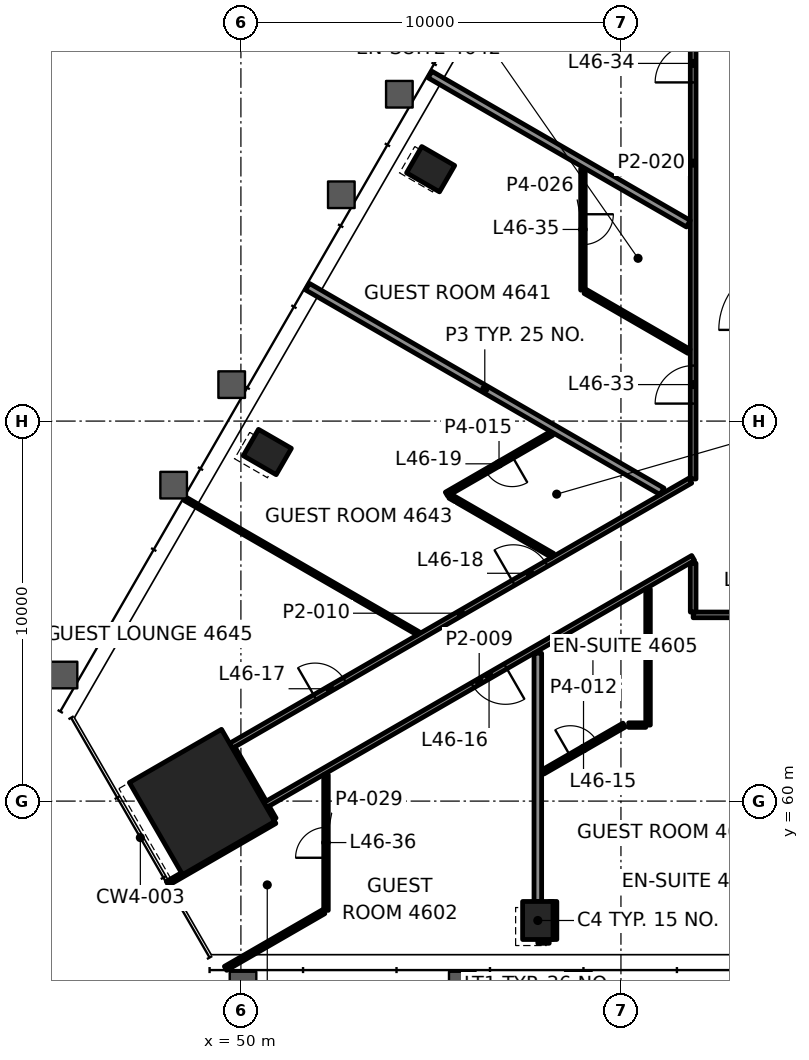
"""IFC4 building model, lengths in metres.
Left out: names, types, materials, properties, quantities, classifications, styles, units other than length and angle.
Written with IfcOpenShell. Run it as: python <this file> out.ifc"""

import sys

from ifc_helpers import new_model, si_unit, direction, frame, frame_2d, origin, origin_2d, place, context, subcontext, project, spatial, rectangle, hollow_rectangle, extrude, element, fill, save


model = new_model("IFC4")
c1 = context("Model", 3, precision=1e-05, world=origin(), true_north=direction((0.0, 1.0)))
c2 = subcontext(c1, "Body", "Model", "MODEL_VIEW")
j1 = project(units=[si_unit("LENGTHUNIT", "METRE"), si_unit("PLANEANGLEUNIT", "RADIAN")], contexts=[c1])
p1 = place(None, origin())
s1 = spatial("IfcSite", under=j1, at=p1, CompositionType="ELEMENT")
p2 = place(p1, origin())
s2 = spatial("IfcBuilding", under=s1, at=p2, CompositionType="ELEMENT")
p3 = place(p2, frame((0.0, 0.0, 198.7)))
s3 = spatial("IfcBuildingStorey", under=s2, at=p3, CompositionType="ELEMENT", Elevation=198.7)
p4 = place(p3, frame((48.978, 59.976, 0.0), z_axis=(0.0, 0.0, 1.0), x_axis=(0.5, -0.866025403784, 0.0)))
e1 = element("IfcColumn", 1, at=p4, inside=s3, PredefinedType="COLUMN", context=c2, shape_type="SweptSolid", body=[
    extrude(rectangle(XDim=2.8, YDim=2.8, at=origin_2d()), origin(), (0.0, 0.0, 1.0), 3.9),
])
for number, where, z_axis, x_axis in (
    (2, (57.812, 56.858, -0.0), (0.0, 0.0, 1.0), (1.0, 0.0, 0.0)),
    (3, (54.992, 76.628, -0.0), (0.0, 0.0, 1.0), (-0.5, -0.866, 0.0)),
    (4, (50.695, 69.186, -0.0), (0.0, 0.0, 1.0), (-0.5, -0.866, 0.0)),
):
    element("IfcColumn", number, at=place(p3, frame(where, z_axis=z_axis, x_axis=x_axis)), inside=s3, PredefinedType="COLUMN", context=c2, shape_type="SweptSolid", body=[
        extrude(hollow_rectangle(XDim=0.8, YDim=1.0, WallThickness=0.05, at=origin_2d()), origin(), (0.0, 0.0, 1.0), 3.9),
    ])
p5 = place(p3, frame((57.812, 56.358, 0.0), z_axis=(0.0, 0.0, 1.0), x_axis=(1.0, 0.0, 0.0)))
e5 = element("IfcWall", 5, at=p5, inside=s3, PredefinedType="PARTITIONING", context=c2, shape_type="SweptSolid", body=[
    extrude(rectangle(XDim=0.3, YDim=0.2, at=frame_2d((0.15, 0.0))), origin(), (0.0, 0.0, 1.0), 3.1),
])
p6 = place(p3, frame((60.203, 62.0, 0.0), z_axis=(0.0, 0.0, 1.0), x_axis=(1.0, 0.0, 0.0)))
e6 = element("IfcWall", 6, at=p6, inside=s3, PredefinedType="PARTITIONING", context=c2, shape_type="SweptSolid", body=[
    extrude(rectangle(XDim=0.449, YDim=0.12, at=frame_2d((0.225, 0.0))), origin(), (0.0, 0.0, 1.0), 3.1),
])
p7 = place(p3, frame((88.1, 64.9, 0.0), z_axis=(0.0, 0.0, 1.0), x_axis=(-1.0, 0.0, 0.0)))
e7 = element("IfcWall", 7, at=p7, inside=s3, PredefinedType="PARTITIONING", context=c2, shape_type="SweptSolid", body=[
    extrude(rectangle(XDim=26.2, YDim=0.15, at=frame_2d((13.1, 0.0))), origin(), (0.0, 0.0, 1.0), 3.1),
])
p8 = place(p7, frame((7.443, 0.0, 0.0)))
e8 = element("IfcOpeningElement", 8, at=p8, cuts=e7, PredefinedType="OPENING", context=c2, shape_type="SweptSolid", body=[
    extrude(rectangle(XDim=1.0, YDim=2.1, at=frame_2d((0.5, 1.05))), frame((0.0, 0.085, 0.0), z_axis=(0.0, -1.0, 0.0), x_axis=(1.0, 0.0, 0.0)), (0.0, 0.0, 1.0), 0.17),
])
p9 = place(p7, frame((16.037, 0.0, 0.0)))
e9 = element("IfcOpeningElement", 9, at=p9, cuts=e7, PredefinedType="OPENING", context=c2, shape_type="SweptSolid", body=[
    extrude(rectangle(XDim=1.0, YDim=2.1, at=frame_2d((0.5, 1.05))), frame((0.0, 0.085, 0.0), z_axis=(0.0, -1.0, 0.0), x_axis=(1.0, 0.0, 0.0)), (0.0, 0.0, 1.0), 0.17),
])
p10 = place(p7, frame((19.747, 0.0, 0.0)))
e10 = element("IfcOpeningElement", 10, at=p10, cuts=e7, PredefinedType="OPENING", context=c2, shape_type="SweptSolid", body=[
    extrude(rectangle(XDim=1.0, YDim=2.1, at=frame_2d((0.5, 1.05))), frame((0.0, 0.085, 0.0), z_axis=(0.0, -1.0, 0.0), x_axis=(1.0, 0.0, 0.0)), (0.0, 0.0, 1.0), 0.17),
])
p11 = place(p7, frame((24.013, 0.0, 0.0)))
e11 = element("IfcOpeningElement", 11, at=p11, cuts=e7, PredefinedType="OPENING", context=c2, shape_type="SweptSolid", body=[
    extrude(rectangle(XDim=1.0, YDim=2.1, at=frame_2d((0.5, 1.05))), frame((0.0, 0.085, 0.0), z_axis=(0.0, -1.0, 0.0), x_axis=(1.0, 0.0, 0.0)), (0.0, 0.0, 1.0), 0.17),
])
p12 = place(p3, frame((49.595, 55.598, 0.0), z_axis=(0.0, 0.0, 1.0), x_axis=(0.866028872743, 0.499993991539, 0.0)))
e12 = element("IfcWall", 12, at=p12, inside=s3, PredefinedType="PARTITIONING", context=c2, shape_type="SweptSolid", body=[
    extrude(rectangle(XDim=2.983, YDim=0.12, at=frame_2d((1.492, 0.0))), origin(), (0.0, 0.0, 1.0), 3.1),
])
p13 = place(p3, frame((57.947, 60.767, 0.0), z_axis=(0.0, 0.0, 1.0), x_axis=(0.866060325455, 0.499939509014, 0.0)))
e13 = element("IfcWall", 13, at=p13, inside=s3, PredefinedType="PARTITIONING", context=c2, shape_type="SweptSolid", body=[
    extrude(rectangle(XDim=2.467, YDim=0.12, at=frame_2d((1.233, 0.0))), origin(), (0.0, 0.0, 1.0), 3.1),
])
p14 = place(p13, frame((0.833, 0.0, 0.0)))
e14 = element("IfcOpeningElement", 14, at=p14, cuts=e13, PredefinedType="OPENING", context=c2, shape_type="SweptSolid", body=[
    extrude(rectangle(XDim=0.8, YDim=2.1, at=frame_2d((0.4, 1.05))), frame((0.0, 0.07, 0.0), z_axis=(0.0, -1.0, 0.0), x_axis=(1.0, 0.0, 0.0)), (0.0, 0.0, 1.0), 0.14),
])
p15 = place(p3, frame((48.067, 57.834, 0.0), z_axis=(0.0, 0.0, 1.0), x_axis=(0.866035906198, 0.499981808845, 0.0)))
e15 = element("IfcWall", 15, at=p15, inside=s3, PredefinedType="PARTITIONING", context=c2, shape_type="SweptSolid", body=[
    extrude(rectangle(XDim=3.259, YDim=0.12, at=frame_2d((1.63, 0.0))), origin(), (0.0, 0.0, 1.0), 3.1),
])
p16 = place(p3, frame((61.9, 66.397, 0.0), z_axis=(0.0, 0.0, 1.0), x_axis=(-0.866028610752, -0.499994445327, 0.0)))
e16 = element("IfcWall", 16, at=p16, inside=s3, PredefinedType="PARTITIONING", context=c2, shape_type="SweptSolid", body=[
    extrude(rectangle(XDim=13.002, YDim=0.15, at=frame_2d((6.501, 0.0))), origin(), (0.0, 0.0, 1.0), 2.947),
])
p17 = place(p16, frame((5.701, 0.0, 0.0)))
e17 = element("IfcOpeningElement", 17, at=p17, cuts=e16, PredefinedType="OPENING", context=c2, shape_type="SweptSolid", body=[
    extrude(rectangle(XDim=1.0, YDim=2.1, at=frame_2d((0.5, 1.05))), frame((0.0, 0.085, 0.0), z_axis=(0.0, -1.0, 0.0), x_axis=(1.0, 0.0, 0.0)), (0.0, 0.0, 1.0), 0.17),
])
p18 = place(p3, frame((49.74, 61.456, 0.0), z_axis=(0.0, 0.0, 1.0), x_axis=(0.866030582951, 0.499991029314, 0.0)))
e18 = element("IfcWall", 18, at=p18, inside=s3, PredefinedType="PARTITIONING", context=c2, shape_type="SweptSolid", body=[
    extrude(rectangle(XDim=13.954, YDim=0.15, at=frame_2d((6.977, 0.0))), origin(), (0.0, 0.0, 1.0), 3.1),
])
p19 = place(p18, frame((2.552, 0.0, 0.0)))
e19 = element("IfcOpeningElement", 19, at=p19, cuts=e18, PredefinedType="OPENING", context=c2, shape_type="SweptSolid", body=[
    extrude(rectangle(XDim=0.9, YDim=2.1, at=frame_2d((0.45, 1.05))), frame((0.0, 0.085, 0.0), z_axis=(0.0, -1.0, 0.0), x_axis=(1.0, 0.0, 0.0)), (0.0, 0.0, 1.0), 0.17),
])
p20 = place(p18, frame((8.579, 0.0, 0.0)))
e20 = element("IfcOpeningElement", 20, at=p20, cuts=e18, PredefinedType="OPENING", context=c2, shape_type="SweptSolid", body=[
    extrude(rectangle(XDim=1.0, YDim=2.1, at=frame_2d((0.5, 1.05))), frame((0.0, 0.085, 0.0), z_axis=(0.0, -1.0, 0.0), x_axis=(1.0, 0.0, 0.0)), (0.0, 0.0, 1.0), 0.17),
])
p21 = place(p3, frame((58.175, 69.674, 0.0), z_axis=(0.0, 0.0, 1.0), x_axis=(-0.866051923801, -0.49995406317, 0.0)))
e21 = element("IfcWall", 21, at=p21, inside=s3, PredefinedType="PARTITIONING", context=c2, shape_type="SweptSolid", body=[
    extrude(rectangle(XDim=3.194, YDim=0.12, at=frame_2d((1.597, 0.0))), origin(), (0.0, 0.0, 1.0), 3.1),
])
p22 = place(p21, frame((1.197, 0.0, 0.0)))
e22 = element("IfcOpeningElement", 22, at=p22, cuts=e21, PredefinedType="OPENING", context=c2, shape_type="SweptSolid", body=[
    extrude(rectangle(XDim=0.8, YDim=2.1, at=frame_2d((0.4, 1.05))), frame((0.0, 0.07, 0.0), z_axis=(0.0, -1.0, 0.0), x_axis=(1.0, 0.0, 0.0)), (0.0, 0.0, 1.0), 0.14),
])
p23 = place(p3, frame((61.9, 64.975, 0.0), z_axis=(0.0, 0.0, 1.0), x_axis=(0.0, 1.0, 0.0)))
e23 = element("IfcWall", 23, at=p23, inside=s3, PredefinedType="PARTITIONING", context=c2, shape_type="SweptSolid", body=[
    extrude(rectangle(XDim=1.286, YDim=0.15, at=frame_2d((0.643, 0.0))), origin(), (0.0, 0.0, 1.0), 2.947),
])
p24 = place(p3, frame((61.9, 68.476, 0.0), z_axis=(0.0, 0.0, 1.0), x_axis=(0.0, 1.0, 0.0)))
e24 = element("IfcWall", 24, at=p24, inside=s3, PredefinedType="PARTITIONING", context=c2, shape_type="SweptSolid", body=[
    extrude(rectangle(XDim=16.624, YDim=0.15, at=frame_2d((8.312, 0.0))), origin(), (0.0, 0.0, 1.0), 3.1),
])
p25 = place(p24, frame((1.984, 0.0, 0.0)))
e25 = element("IfcOpeningElement", 25, at=p25, cuts=e24, PredefinedType="OPENING", context=c2, shape_type="SweptSolid", body=[
    extrude(rectangle(XDim=1.0, YDim=2.1, at=frame_2d((0.5, 1.05))), frame((0.0, 0.085, 0.0), z_axis=(0.0, -1.0, 0.0), x_axis=(1.0, 0.0, 0.0)), (0.0, 0.0, 1.0), 0.17),
])
p26 = place(p24, frame((10.437, 0.0, 0.0)))
e26 = element("IfcOpeningElement", 26, at=p26, cuts=e24, PredefinedType="OPENING", context=c2, shape_type="SweptSolid", body=[
    extrude(rectangle(XDim=1.0, YDim=2.1, at=frame_2d((0.5, 1.05))), frame((0.0, 0.085, 0.0), z_axis=(0.0, -1.0, 0.0), x_axis=(1.0, 0.0, 0.0)), (0.0, 0.0, 1.0), 0.17),
])
p27 = place(p3, frame((60.713, 62.0, 0.0), z_axis=(0.0, 0.0, 1.0), x_axis=(0.0, 1.0, 0.0)))
e27 = element("IfcWall", 27, at=p27, inside=s3, PredefinedType="PARTITIONING", context=c2, shape_type="SweptSolid", body=[
    extrude(rectangle(XDim=3.585, YDim=0.12, at=frame_2d((1.793, 0.0))), origin(), (0.0, 0.0, 1.0), 2.947),
])
p28 = place(p3, frame((59.0, 76.64, 0.0), z_axis=(0.0, 0.0, 1.0), x_axis=(0.0, -1.0, 0.0)))
e28 = element("IfcWall", 28, at=p28, inside=s3, PredefinedType="PARTITIONING", context=c2, shape_type="SweptSolid", body=[
    extrude(rectangle(XDim=3.194, YDim=0.12, at=frame_2d((1.597, 0.0))), origin(), (0.0, 0.0, 1.0), 3.1),
])
p29 = place(p28, frame((1.197, 0.0, 0.0)))
e29 = element("IfcOpeningElement", 29, at=p29, cuts=e28, PredefinedType="OPENING", context=c2, shape_type="SweptSolid", body=[
    extrude(rectangle(XDim=0.8, YDim=2.1, at=frame_2d((0.4, 1.05))), frame((0.0, 0.07, 0.0), z_axis=(0.0, -1.0, 0.0), x_axis=(1.0, 0.0, 0.0)), (0.0, 0.0, 1.0), 0.14),
])
p30 = place(p3, frame((58.213, 56.358, 0.0), z_axis=(0.0, 0.0, 1.0), x_axis=(0.0, 1.0, 0.0)))
e30 = element("IfcWall", 30, at=p30, inside=s3, PredefinedType="PARTITIONING", context=c2, shape_type="SweptSolid", body=[
    extrude(rectangle(XDim=1.0, YDim=0.2, at=frame_2d((0.5, 0.0))), origin(), (0.0, 0.0, 1.0), 3.022),
])
p31 = place(p3, frame((57.813, 57.358, 0.0), z_axis=(0.0, 0.0, 1.0), x_axis=(0.0, 1.0, 0.0)))
e31 = element("IfcWall", 31, at=p31, inside=s3, PredefinedType="PARTITIONING", context=c2, shape_type="SweptSolid", body=[
    extrude(rectangle(XDim=6.532, YDim=0.2, at=frame_2d((3.266, 0.0))), origin(), (0.0, 0.0, 1.0), 3.1),
])
p32 = place(p3, frame((52.239, 57.125, 0.0), z_axis=(0.0, 0.0, 1.0), x_axis=(0.0, 1.0, 0.0)))
e32 = element("IfcWall", 32, at=p32, inside=s3, PredefinedType="PARTITIONING", context=c2, shape_type="SweptSolid", body=[
    extrude(rectangle(XDim=3.569, YDim=0.12, at=frame_2d((1.784, 0.0))), origin(), (0.0, 0.0, 1.0), 3.1),
])
p33 = place(p32, frame((1.384, 0.0, 0.0)))
e33 = element("IfcOpeningElement", 33, at=p33, cuts=e32, PredefinedType="OPENING", context=c2, shape_type="SweptSolid", body=[
    extrude(rectangle(XDim=0.8, YDim=2.1, at=frame_2d((0.4, 1.05))), frame((0.0, 0.07, 0.0), z_axis=(0.0, -1.0, 0.0), x_axis=(1.0, 0.0, 0.0)), (0.0, 0.0, 1.0), 0.14),
])
p34 = place(p3, frame((50.86, 59.516, 0.0), z_axis=(0.0, 0.0, 1.0), x_axis=(-0.499741784413, 0.866174433305, 0.0)))
e34 = element("IfcWall", 34, at=p34, inside=s3, PredefinedType="PARTITIONING", context=c2, shape_type="SweptSolid", body=[
    extrude(rectangle(XDim=0.365, YDim=0.15, at=frame_2d((0.182, 0.0))), origin(), (0.0, 0.0, 1.0), 3.1),
])
p35 = place(p3, frame((61.773, 75.195, 0.0), z_axis=(0.0, 0.0, 1.0), x_axis=(-0.866029689717, 0.499992576473, 0.0)))
e35 = element("IfcWall", 35, at=p35, inside=s3, PredefinedType="PARTITIONING", context=c2, shape_type="SweptSolid", body=[
    extrude(rectangle(XDim=7.85, YDim=0.2, at=frame_2d((3.925, 0.0))), origin(), (0.0, 0.0, 1.0), 3.022),
])
p36 = place(p3, frame((61.79, 71.835, 0.0), z_axis=(0.0, 0.0, 1.0), x_axis=(-0.866028267601, 0.499995039691, 0.0)))
e36 = element("IfcWall", 36, at=p36, inside=s3, PredefinedType="PARTITIONING", context=c2, shape_type="SweptSolid", body=[
    extrude(rectangle(XDim=3.153, YDim=0.12, at=frame_2d((1.576, 0.0))), origin(), (0.0, 0.0, 1.0), 3.1),
])
p37 = place(p3, frame((61.082, 68.15, 0.0), z_axis=(0.0, 0.0, 1.0), x_axis=(-0.866015766609, 0.500016691706, 0.0)))
e37 = element("IfcWall", 37, at=p37, inside=s3, PredefinedType="PARTITIONING", context=c2, shape_type="SweptSolid", body=[
    extrude(rectangle(XDim=10.774, YDim=0.2, at=frame_2d((5.387, 0.0))), origin(), (0.0, 0.0, 1.0), 3.022),
])
p38 = place(p3, frame((58.199, 66.466, 0.0), z_axis=(0.0, 0.0, 1.0), x_axis=(-0.866028856698, 0.499994019331, 0.0)))
e38 = element("IfcWall", 38, at=p38, inside=s3, PredefinedType="PARTITIONING", context=c2, shape_type="SweptSolid", body=[
    extrude(rectangle(XDim=3.113, YDim=0.12, at=frame_2d((1.556, 0.0))), origin(), (0.0, 0.0, 1.0), 3.1),
])
p39 = place(p3, frame((54.663, 64.414, 0.0), z_axis=(0.0, 0.0, 1.0), x_axis=(-0.866013364391, 0.500020852261, 0.0)))
e39 = element("IfcWall", 39, at=p39, inside=s3, PredefinedType="PARTITIONING", context=c2, shape_type="SweptSolid", body=[
    extrude(rectangle(XDim=7.082, YDim=0.1, at=frame_2d((3.541, 0.0))), origin(), (0.0, 0.0, 1.0), 3.1),
])
p40 = place(p3, frame((50.603, 59.962, 0.0), z_axis=(0.0, 0.0, 1.0), x_axis=(-0.499991515992, 0.866030301974, 0.0)))
e40 = element("IfcWall", 40, at=p40, inside=s3, PredefinedType="PARTITIONING", context=c2, shape_type="SweptSolid", body=[
    extrude(rectangle(XDim=1.649, YDim=0.15, at=frame_2d((0.825, 0.0))), origin(), (0.0, 0.0, 1.0), 2.947),
])
p41 = place(p14, origin())
e41 = element("IfcDoor", 41, at=p41, inside=s3, OperationType="SINGLE_SWING_RIGHT", PredefinedType="DOOR", context=c2, shape_type="SweptSolid", body=[
    extrude(rectangle(XDim=0.8, YDim=2.1, at=frame_2d((0.4, 1.05))), frame((0.0, 0.025, 0.0), z_axis=(0.0, -1.0, 0.0), x_axis=(1.0, 0.0, 0.0)), (0.0, 0.0, 1.0), 0.05),
])
fill(e14, e41)
p42 = place(p17, origin())
e42 = element("IfcDoor", 42, at=p42, inside=s3, OperationType="SINGLE_SWING_RIGHT", PredefinedType="DOOR", context=c2, shape_type="SweptSolid", body=[
    extrude(rectangle(XDim=1.0, YDim=2.1, at=frame_2d((0.5, 1.05))), frame((0.0, 0.025, 0.0), z_axis=(0.0, -1.0, 0.0), x_axis=(1.0, 0.0, 0.0)), (0.0, 0.0, 1.0), 0.05),
])
fill(e17, e42)
p43 = place(p19, origin())
e43 = element("IfcDoor", 43, at=p43, inside=s3, OperationType="SINGLE_SWING_RIGHT", PredefinedType="DOOR", context=c2, shape_type="SweptSolid", body=[
    extrude(rectangle(XDim=0.9, YDim=2.1, at=frame_2d((0.45, 1.05))), frame((0.0, 0.025, 0.0), z_axis=(0.0, -1.0, 0.0), x_axis=(1.0, 0.0, 0.0)), (0.0, 0.0, 1.0), 0.05),
])
fill(e19, e43)
p44 = place(p20, origin())
e44 = element("IfcDoor", 44, at=p44, inside=s3, OperationType="SINGLE_SWING_RIGHT", PredefinedType="DOOR", context=c2, shape_type="SweptSolid", body=[
    extrude(rectangle(XDim=1.0, YDim=2.1, at=frame_2d((0.5, 1.05))), frame((0.0, 0.025, 0.0), z_axis=(0.0, -1.0, 0.0), x_axis=(1.0, 0.0, 0.0)), (0.0, 0.0, 1.0), 0.05),
])
fill(e20, e44)
p45 = place(p22, origin())
e45 = element("IfcDoor", 45, at=p45, inside=s3, OperationType="SINGLE_SWING_RIGHT", PredefinedType="DOOR", context=c2, shape_type="SweptSolid", body=[
    extrude(rectangle(XDim=0.8, YDim=2.1, at=frame_2d((0.4, 1.05))), frame((0.0, 0.025, 0.0), z_axis=(0.0, -1.0, 0.0), x_axis=(1.0, 0.0, 0.0)), (0.0, 0.0, 1.0), 0.05),
])
fill(e22, e45)
p46 = place(p25, origin())
e46 = element("IfcDoor", 46, at=p46, inside=s3, OperationType="SINGLE_SWING_RIGHT", PredefinedType="DOOR", context=c2, shape_type="SweptSolid", body=[
    extrude(rectangle(XDim=1.0, YDim=2.1, at=frame_2d((0.5, 1.05))), frame((0.0, 0.025, 0.0), z_axis=(0.0, -1.0, 0.0), x_axis=(1.0, 0.0, 0.0)), (0.0, 0.0, 1.0), 0.05),
])
fill(e25, e46)
p47 = place(p26, origin())
e47 = element("IfcDoor", 47, at=p47, inside=s3, OperationType="SINGLE_SWING_RIGHT", PredefinedType="DOOR", context=c2, shape_type="SweptSolid", body=[
    extrude(rectangle(XDim=1.0, YDim=2.1, at=frame_2d((0.5, 1.05))), frame((0.0, 0.025, 0.0), z_axis=(0.0, -1.0, 0.0), x_axis=(1.0, 0.0, 0.0)), (0.0, 0.0, 1.0), 0.05),
])
fill(e26, e47)
p48 = place(p29, origin())
e48 = element("IfcDoor", 48, at=p48, inside=s3, OperationType="SINGLE_SWING_RIGHT", PredefinedType="DOOR", context=c2, shape_type="SweptSolid", body=[
    extrude(rectangle(XDim=0.8, YDim=2.1, at=frame_2d((0.4, 1.05))), frame((0.0, 0.025, 0.0), z_axis=(0.0, -1.0, 0.0), x_axis=(1.0, 0.0, 0.0)), (0.0, 0.0, 1.0), 0.05),
])
fill(e29, e48)
p49 = place(p33, origin())
e49 = element("IfcDoor", 49, at=p49, inside=s3, OperationType="SINGLE_SWING_RIGHT", PredefinedType="DOOR", context=c2, shape_type="SweptSolid", body=[
    extrude(rectangle(XDim=0.8, YDim=2.1, at=frame_2d((0.4, 1.05))), frame((0.0, 0.025, 0.0), z_axis=(0.0, -1.0, 0.0), x_axis=(1.0, 0.0, 0.0)), (0.0, 0.0, 1.0), 0.05),
])
fill(e33, e49)
p50 = place(p3, origin())
p51 = place(p50, frame((52.085, 55.553, 0.15), z_axis=(0.0, 0.0, 1.0), x_axis=(1.0, 0.0, 0.0)))
p52 = place(p51, origin())
e50 = element("IfcWindow", 50, at=p52, inside=s3, PartitioningType="SINGLE_PANEL", PredefinedType="WINDOW", context=c2, shape_type="SweptSolid", body=[
    extrude(rectangle(XDim=2.789, YDim=3.55, at=frame_2d((1.395, 1.775))), frame((0.0, 0.03, 0.0), z_axis=(0.0, -1.0, 0.0), x_axis=(1.0, 0.0, 0.0)), (0.0, 0.0, 1.0), 0.06),
])
p53 = place(p50, frame((52.4, 74.749, 0.15), z_axis=(0.0, 0.0, 1.0), x_axis=(-0.5, -0.866025, 0.0)))
p54 = place(p53, origin())
e51 = element("IfcWindow", 51, at=p54, inside=s3, PartitioningType="SINGLE_PANEL", PredefinedType="WINDOW", context=c2, shape_type="SweptSolid", body=[
    extrude(rectangle(XDim=2.789, YDim=3.55, at=frame_2d((1.395, 1.775))), frame((0.0, 0.03, 0.0), z_axis=(0.0, -1.0, 0.0), x_axis=(1.0, 0.0, 0.0)), (0.0, 0.0, 1.0), 0.06),
])
save(model, sys.argv[1])
